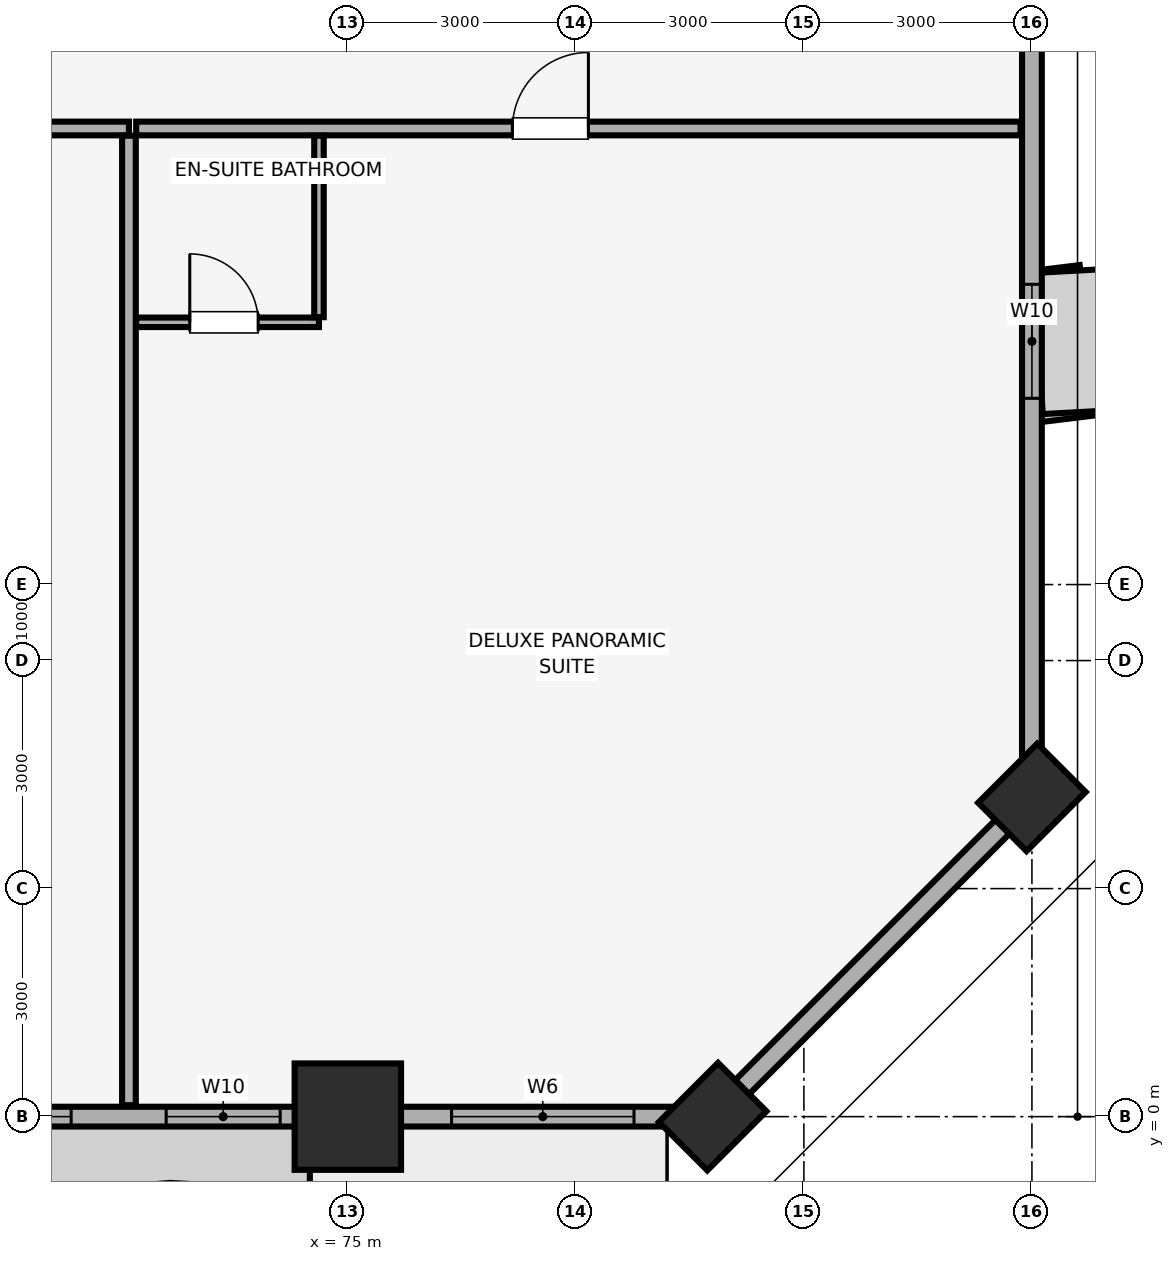
"""IFC4 building model, lengths in metres.
Left out: names, types, materials, properties, quantities, classifications, styles, units other than length and angle.
Written with IfcOpenShell. Run it as: python <this file> out.ifc"""

import sys

from ifc_helpers import new_model, si_unit, direction, frame, frame_2d, origin, origin_2d, place, context, subcontext, project, spatial, rectangle, extrude, element, fill, save


model = new_model("IFC4")
c1 = context("Model", 3, precision=1e-05, world=origin(), true_north=direction((0.0, 1.0)))
c2 = subcontext(c1, "Body", "Model", "MODEL_VIEW")
j1 = project(units=[si_unit("LENGTHUNIT", "METRE"), si_unit("PLANEANGLEUNIT", "RADIAN")], contexts=[c1])
p1 = place(None, origin())
s1 = spatial("IfcSite", under=j1, at=p1, CompositionType="ELEMENT")
p2 = place(p1, origin())
s2 = spatial("IfcBuilding", under=s1, at=p2, CompositionType="ELEMENT")
p3 = place(p2, frame((0.0, 0.0, 68.9)))
s3 = spatial("IfcBuildingStorey", under=s2, at=p3, CompositionType="ELEMENT", Elevation=68.9)
p4 = place(p3, frame((75.0, 0.0, 0.0), z_axis=(0.0, 0.0, 1.0), x_axis=(1.0, 0.0, 0.0)))
e1 = element("IfcColumn", 1, at=p4, inside=s3, PredefinedType="COLUMN", context=c2, shape_type="SweptSolid", body=[
    extrude(rectangle(XDim=1.4, YDim=1.4, at=origin_2d()), origin(), (0.0, 0.0, 1.0), 3.51),
])
for number, where, z_axis, x_axis in (
    (2, (79.8, 0.0, 0.0), (0.0, 0.0, 1.0), (0.707, 0.707, 0.0)),
    (3, (84.0, 4.2, 0.0), (0.0, 0.0, 1.0), (0.707, 0.707, 0.0)),
):
    element("IfcColumn", number, at=place(p3, frame(where, z_axis=z_axis, x_axis=x_axis)), inside=s3, PredefinedType="PILASTER", context=c2, shape_type="SweptSolid", body=[
        extrude(rectangle(XDim=1.1, YDim=0.9, at=origin_2d()), origin(), (0.0, 0.0, 1.0), 3.51),
    ])
p5 = place(p3, frame((4.2, 0.0, 0.0), z_axis=(0.0, 0.0, 1.0), x_axis=(1.0, 0.0, 0.0)))
e4 = element("IfcWall", 4, at=p5, inside=s3, PredefinedType="SOLIDWALL", context=c2, shape_type="SweptSolid", body=[
    extrude(rectangle(XDim=75.6, YDim=0.26, at=frame_2d((37.8, 0.0))), origin(), (0.0, 0.0, 1.0), 2.56),
])
p6 = place(p5, frame((13.517, 0.0, 0.0)))
e5 = element("IfcOpeningElement", 5, at=p6, cuts=e4, PredefinedType="OPENING", context=c2, shape_type="SweptSolid", body=[
    extrude(rectangle(XDim=1.1, YDim=2.15, at=frame_2d((0.55, 1.075))), frame((0.0, 0.14, 0.0), z_axis=(0.0, -1.0, 0.0), x_axis=(1.0, 0.0, 0.0)), (0.0, 0.0, 1.0), 0.28),
])
p7 = place(p5, frame((28.183, 0.0, 0.0)))
e6 = element("IfcOpeningElement", 6, at=p7, cuts=e4, PredefinedType="OPENING", context=c2, shape_type="SweptSolid", body=[
    extrude(rectangle(XDim=1.1, YDim=2.15, at=frame_2d((0.55, 1.075))), frame((0.0, 0.14, 0.0), z_axis=(0.0, -1.0, 0.0), x_axis=(1.0, 0.0, 0.0)), (0.0, 0.0, 1.0), 0.28),
])
p8 = place(p5, frame((58.094, 0.0, 0.0)))
e7 = element("IfcOpeningElement", 7, at=p8, cuts=e4, PredefinedType="OPENING", context=c2, shape_type="SweptSolid", body=[
    extrude(rectangle(XDim=1.1, YDim=2.15, at=frame_2d((0.55, 1.075))), frame((0.0, 0.14, 0.0), z_axis=(0.0, -1.0, 0.0), x_axis=(1.0, 0.0, 0.0)), (0.0, 0.0, 1.0), 0.28),
])
p9 = place(p5, frame((1.035, 0.0, 0.85)))
e8 = element("IfcOpeningElement", 8, at=p9, cuts=e4, PredefinedType="OPENING", context=c2, shape_type="SweptSolid", body=[
    extrude(rectangle(XDim=2.4, YDim=1.5, at=frame_2d((1.2, 0.75))), frame((0.0, 0.14, 0.0), z_axis=(0.0, -1.0, 0.0), x_axis=(1.0, 0.0, 0.0)), (0.0, 0.0, 1.0), 0.28),
])
p10 = place(p5, frame((5.74, 0.0, 0.85)))
e9 = element("IfcOpeningElement", 9, at=p10, cuts=e4, PredefinedType="OPENING", context=c2, shape_type="SweptSolid", body=[
    extrude(rectangle(XDim=1.5, YDim=1.4, at=frame_2d((0.75, 0.7))), frame((0.0, 0.14, 0.0), z_axis=(0.0, -1.0, 0.0), x_axis=(1.0, 0.0, 0.0)), (0.0, 0.0, 1.0), 0.28),
])
p11 = place(p5, frame((8.49, 0.0, 0.85)))
e10 = element("IfcOpeningElement", 10, at=p11, cuts=e4, PredefinedType="OPENING", context=c2, shape_type="SweptSolid", body=[
    extrude(rectangle(XDim=2.4, YDim=1.5, at=frame_2d((1.2, 0.75))), frame((0.0, 0.14, 0.0), z_axis=(0.0, -1.0, 0.0), x_axis=(1.0, 0.0, 0.0)), (0.0, 0.0, 1.0), 0.28),
])
p12 = place(p5, frame((15.855, 0.0, 0.85)))
e11 = element("IfcOpeningElement", 11, at=p12, cuts=e4, PredefinedType="OPENING", context=c2, shape_type="SweptSolid", body=[
    extrude(rectangle(XDim=2.4, YDim=1.5, at=frame_2d((1.2, 0.75))), frame((0.0, 0.14, 0.0), z_axis=(0.0, -1.0, 0.0), x_axis=(1.0, 0.0, 0.0)), (0.0, 0.0, 1.0), 0.28),
])
p13 = place(p5, frame((20.02, 0.0, 0.85)))
e12 = element("IfcOpeningElement", 12, at=p13, cuts=e4, PredefinedType="OPENING", context=c2, shape_type="SweptSolid", body=[
    extrude(rectangle(XDim=2.4, YDim=1.5, at=frame_2d((1.2, 0.75))), frame((0.0, 0.14, 0.0), z_axis=(0.0, -1.0, 0.0), x_axis=(1.0, 0.0, 0.0)), (0.0, 0.0, 1.0), 0.28),
])
p14 = place(p5, frame((23.67, 0.0, 0.85)))
e13 = element("IfcOpeningElement", 13, at=p14, cuts=e4, PredefinedType="OPENING", context=c2, shape_type="SweptSolid", body=[
    extrude(rectangle(XDim=1.5, YDim=1.4, at=frame_2d((0.75, 0.7))), frame((0.0, 0.14, 0.0), z_axis=(0.0, -1.0, 0.0), x_axis=(1.0, 0.0, 0.0)), (0.0, 0.0, 1.0), 0.28),
])
p15 = place(p5, frame((31.035, 0.0, 0.85)))
e14 = element("IfcOpeningElement", 14, at=p15, cuts=e4, PredefinedType="OPENING", context=c2, shape_type="SweptSolid", body=[
    extrude(rectangle(XDim=1.5, YDim=1.4, at=frame_2d((0.75, 0.7))), frame((0.0, 0.14, 0.0), z_axis=(0.0, -1.0, 0.0), x_axis=(1.0, 0.0, 0.0)), (0.0, 0.0, 1.0), 0.28),
])
p16 = place(p5, frame((34.75, 0.0, 0.85)))
e15 = element("IfcOpeningElement", 15, at=p16, cuts=e4, PredefinedType="OPENING", context=c2, shape_type="SweptSolid", body=[
    extrude(rectangle(XDim=2.4, YDim=1.5, at=frame_2d((1.2, 0.75))), frame((0.0, 0.14, 0.0), z_axis=(0.0, -1.0, 0.0), x_axis=(1.0, 0.0, 0.0)), (0.0, 0.0, 1.0), 0.28),
])
p17 = place(p5, frame((38.55, 0.0, 0.85)))
e16 = element("IfcOpeningElement", 16, at=p17, cuts=e4, PredefinedType="OPENING", context=c2, shape_type="SweptSolid", body=[
    extrude(rectangle(XDim=2.4, YDim=1.5, at=frame_2d((1.2, 0.75))), frame((0.0, 0.14, 0.0), z_axis=(0.0, -1.0, 0.0), x_axis=(1.0, 0.0, 0.0)), (0.0, 0.0, 1.0), 0.28),
])
p18 = place(p5, frame((43.165, 0.0, 0.85)))
e17 = element("IfcOpeningElement", 17, at=p18, cuts=e4, PredefinedType="OPENING", context=c2, shape_type="SweptSolid", body=[
    extrude(rectangle(XDim=1.5, YDim=1.4, at=frame_2d((0.75, 0.7))), frame((0.0, 0.14, 0.0), z_axis=(0.0, -1.0, 0.0), x_axis=(1.0, 0.0, 0.0)), (0.0, 0.0, 1.0), 0.28),
])
p19 = place(p5, frame((45.915, 0.0, 0.85)))
e18 = element("IfcOpeningElement", 18, at=p19, cuts=e4, PredefinedType="OPENING", context=c2, shape_type="SweptSolid", body=[
    extrude(rectangle(XDim=2.4, YDim=1.5, at=frame_2d((1.2, 0.75))), frame((0.0, 0.14, 0.0), z_axis=(0.0, -1.0, 0.0), x_axis=(1.0, 0.0, 0.0)), (0.0, 0.0, 1.0), 0.28),
])
p20 = place(p5, frame((50.081, 0.0, 0.85)))
e19 = element("IfcOpeningElement", 19, at=p20, cuts=e4, PredefinedType="OPENING", context=c2, shape_type="SweptSolid", body=[
    extrude(rectangle(XDim=2.4, YDim=1.5, at=frame_2d((1.2, 0.75))), frame((0.0, 0.14, 0.0), z_axis=(0.0, -1.0, 0.0), x_axis=(1.0, 0.0, 0.0)), (0.0, 0.0, 1.0), 0.28),
])
p21 = place(p5, frame((53.73, 0.0, 0.85)))
e20 = element("IfcOpeningElement", 20, at=p21, cuts=e4, PredefinedType="OPENING", context=c2, shape_type="SweptSolid", body=[
    extrude(rectangle(XDim=1.5, YDim=1.4, at=frame_2d((0.75, 0.7))), frame((0.0, 0.14, 0.0), z_axis=(0.0, -1.0, 0.0), x_axis=(1.0, 0.0, 0.0)), (0.0, 0.0, 1.0), 0.28),
])
p22 = place(p5, frame((61.095, 0.0, 0.85)))
e21 = element("IfcOpeningElement", 21, at=p22, cuts=e4, PredefinedType="OPENING", context=c2, shape_type="SweptSolid", body=[
    extrude(rectangle(XDim=1.5, YDim=1.4, at=frame_2d((0.75, 0.7))), frame((0.0, 0.14, 0.0), z_axis=(0.0, -1.0, 0.0), x_axis=(1.0, 0.0, 0.0)), (0.0, 0.0, 1.0), 0.28),
])
p23 = place(p5, frame((64.76, 0.0, 0.85)))
e22 = element("IfcOpeningElement", 22, at=p23, cuts=e4, PredefinedType="OPENING", context=c2, shape_type="SweptSolid", body=[
    extrude(rectangle(XDim=2.4, YDim=1.5, at=frame_2d((1.2, 0.75))), frame((0.0, 0.14, 0.0), z_axis=(0.0, -1.0, 0.0), x_axis=(1.0, 0.0, 0.0)), (0.0, 0.0, 1.0), 0.28),
])
p24 = place(p5, frame((68.41, 0.0, 0.85)))
e23 = element("IfcOpeningElement", 23, at=p24, cuts=e4, PredefinedType="OPENING", context=c2, shape_type="SweptSolid", body=[
    extrude(rectangle(XDim=1.5, YDim=1.4, at=frame_2d((0.75, 0.7))), frame((0.0, 0.14, 0.0), z_axis=(0.0, -1.0, 0.0), x_axis=(1.0, 0.0, 0.0)), (0.0, 0.0, 1.0), 0.28),
])
p25 = place(p5, frame((72.165, 0.0, 0.85)))
e24 = element("IfcOpeningElement", 24, at=p25, cuts=e4, PredefinedType="OPENING", context=c2, shape_type="SweptSolid", body=[
    extrude(rectangle(XDim=2.4, YDim=1.5, at=frame_2d((1.2, 0.75))), frame((0.0, 0.14, 0.0), z_axis=(0.0, -1.0, 0.0), x_axis=(1.0, 0.0, 0.0)), (0.0, 0.0, 1.0), 0.28),
])
p26 = place(p3, frame((79.8, 0.0, 0.0), z_axis=(0.0, 0.0, 1.0), x_axis=(0.707106781187, 0.707106781187, 0.0)))
e25 = element("IfcWall", 25, at=p26, inside=s3, PredefinedType="SOLIDWALL", context=c2, shape_type="SweptSolid", body=[
    extrude(rectangle(XDim=5.94, YDim=0.26, at=frame_2d((2.97, 0.0))), origin(), (0.0, 0.0, 1.0), 2.56),
])
p27 = place(p3, frame((84.0, 4.2, 0.0), z_axis=(0.0, 0.0, 1.0), x_axis=(0.0, 1.0, 0.0)))
e26 = element("IfcWall", 26, at=p27, inside=s3, PredefinedType="SOLIDWALL", context=c2, shape_type="SweptSolid", body=[
    extrude(rectangle(XDim=40.6, YDim=0.26, at=frame_2d((20.3, 0.0))), origin(), (0.0, 0.0, 1.0), 2.56),
])
p28 = place(p27, frame((5.25, 0.0, 0.85)))
e27 = element("IfcOpeningElement", 27, at=p28, cuts=e26, PredefinedType="OPENING", context=c2, shape_type="SweptSolid", body=[
    extrude(rectangle(XDim=1.5, YDim=1.4, at=frame_2d((0.75, 0.7))), frame((0.0, 0.14, 0.0), z_axis=(0.0, -1.0, 0.0), x_axis=(1.0, 0.0, 0.0)), (0.0, 0.0, 1.0), 0.28),
])
p29 = place(p27, frame((13.81, 0.0, 0.85)))
e28 = element("IfcOpeningElement", 28, at=p29, cuts=e26, PredefinedType="OPENING", context=c2, shape_type="SweptSolid", body=[
    extrude(rectangle(XDim=1.5, YDim=1.4, at=frame_2d((0.75, 0.7))), frame((0.0, 0.14, 0.0), z_axis=(0.0, -1.0, 0.0), x_axis=(1.0, 0.0, 0.0)), (0.0, 0.0, 1.0), 0.28),
])
p30 = place(p27, frame((20.61, 0.0, 0.85)))
e29 = element("IfcOpeningElement", 29, at=p30, cuts=e26, PredefinedType="OPENING", context=c2, shape_type="SweptSolid", body=[
    extrude(rectangle(XDim=1.5, YDim=1.4, at=frame_2d((0.75, 0.7))), frame((0.0, 0.14, 0.0), z_axis=(0.0, -1.0, 0.0), x_axis=(1.0, 0.0, 0.0)), (0.0, 0.0, 1.0), 0.28),
])
p31 = place(p27, frame((28.525, 0.0, 0.85)))
e30 = element("IfcOpeningElement", 30, at=p31, cuts=e26, PredefinedType="OPENING", context=c2, shape_type="SweptSolid", body=[
    extrude(rectangle(XDim=1.5, YDim=1.4, at=frame_2d((0.75, 0.7))), frame((0.0, 0.14, 0.0), z_axis=(0.0, -1.0, 0.0), x_axis=(1.0, 0.0, 0.0)), (0.0, 0.0, 1.0), 0.28),
])
p32 = place(p27, frame((37.365, 0.0, 0.85)))
e31 = element("IfcOpeningElement", 31, at=p32, cuts=e26, PredefinedType="OPENING", context=c2, shape_type="SweptSolid", body=[
    extrude(rectangle(XDim=1.5, YDim=1.4, at=frame_2d((0.75, 0.7))), frame((0.0, 0.14, 0.0), z_axis=(0.0, -1.0, 0.0), x_axis=(1.0, 0.0, 0.0)), (0.0, 0.0, 1.0), 0.28),
])
p33 = place(p3, frame((64.786, 13.0, 0.0), z_axis=(0.0, 0.0, 1.0), x_axis=(1.0, 0.0, 0.0)))
e32 = element("IfcWall", 32, at=p33, inside=s3, PredefinedType="PARTITIONING", context=c2, shape_type="SweptSolid", body=[
    extrude(rectangle(XDim=7.335, YDim=0.18, at=frame_2d((3.667, 0.0))), origin(), (0.0, 0.0, 1.0), 3.51),
])
p34 = place(p33, frame((5.064, 0.0, 0.0)))
e33 = element("IfcOpeningElement", 33, at=p34, cuts=e32, PredefinedType="OPENING", context=c2, shape_type="SweptSolid", body=[
    extrude(rectangle(XDim=1.0, YDim=2.15, at=frame_2d((0.5, 1.075))), frame((0.0, 0.1, 0.0), z_axis=(0.0, -1.0, 0.0), x_axis=(1.0, 0.0, 0.0)), (0.0, 0.0, 1.0), 0.2),
])
p35 = place(p3, frame((72.12, 0.15, 0.0), z_axis=(0.0, 0.0, 1.0), x_axis=(0.0, 1.0, 0.0)))
e34 = element("IfcWall", 34, at=p35, inside=s3, PredefinedType="PARTITIONING", context=c2, shape_type="SweptSolid", body=[
    extrude(rectangle(XDim=12.755, YDim=0.18, at=frame_2d((6.377, 0.0))), origin(), (0.0, 0.0, 1.0), 3.51),
])
p36 = place(p3, frame((72.215, 13.0, 0.0), z_axis=(0.0, 0.0, 1.0), x_axis=(1.0, 0.0, 0.0)))
e35 = element("IfcWall", 35, at=p36, inside=s3, PredefinedType="PARTITIONING", context=c2, shape_type="SweptSolid", body=[
    extrude(rectangle(XDim=11.635, YDim=0.18, at=frame_2d((5.817, 0.0))), origin(), (0.0, 0.0, 1.0), 3.51),
])
p37 = place(p36, frame((4.95, 0.0, 0.0)))
e36 = element("IfcOpeningElement", 36, at=p37, cuts=e35, PredefinedType="OPENING", context=c2, shape_type="SweptSolid", body=[
    extrude(rectangle(XDim=1.0, YDim=2.15, at=frame_2d((0.5, 1.075))), frame((0.0, 0.1, 0.0), z_axis=(0.0, -1.0, 0.0), x_axis=(1.0, 0.0, 0.0)), (0.0, 0.0, 1.0), 0.2),
])
p38 = place(p3, frame((72.215, 10.45, 0.0), z_axis=(0.0, 0.0, 1.0), x_axis=(1.0, 0.0, 0.0)))
e37 = element("IfcWall", 37, at=p38, inside=s3, PredefinedType="PARTITIONING", context=c2, shape_type="SweptSolid", body=[
    extrude(rectangle(XDim=2.405, YDim=0.125, at=frame_2d((1.203, 0.0))), origin(), (0.0, 0.0, 1.0), 3.51),
])
p39 = place(p38, frame((0.705, 0.0, 0.0)))
e38 = element("IfcOpeningElement", 38, at=p39, cuts=e37, PredefinedType="OPENING", context=c2, shape_type="SweptSolid", body=[
    extrude(rectangle(XDim=0.9, YDim=2.1, at=frame_2d((0.45, 1.05))), frame((0.0, 0.073, 0.0), z_axis=(0.0, -1.0, 0.0), x_axis=(1.0, 0.0, 0.0)), (0.0, 0.0, 1.0), 0.145),
])
p40 = place(p3, frame((74.62, 10.518, 0.0), z_axis=(0.0, 0.0, 1.0), x_axis=(0.0, 1.0, 0.0)))
e39 = element("IfcWall", 39, at=p40, inside=s3, PredefinedType="PARTITIONING", context=c2, shape_type="SweptSolid", body=[
    extrude(rectangle(XDim=2.387, YDim=0.125, at=frame_2d((1.194, 0.0))), origin(), (0.0, 0.0, 1.0), 3.51),
])
p41 = place(p23, origin())
e40 = element("IfcWindow", 40, at=p41, inside=s3, PartitioningType="SINGLE_PANEL", PredefinedType="WINDOW", context=c2, shape_type="SweptSolid", body=[
    extrude(rectangle(XDim=2.4, YDim=1.5, at=frame_2d((1.2, 0.75))), frame((0.0, 0.03, 0.0), z_axis=(0.0, -1.0, 0.0), x_axis=(1.0, 0.0, 0.0)), (0.0, 0.0, 1.0), 0.06),
])
fill(e22, e40)
p42 = place(p24, origin())
e41 = element("IfcWindow", 41, at=p42, inside=s3, PartitioningType="SINGLE_PANEL", PredefinedType="WINDOW", context=c2, shape_type="SweptSolid", body=[
    extrude(rectangle(XDim=1.5, YDim=1.4, at=frame_2d((0.75, 0.7))), frame((0.0, 0.03, 0.0), z_axis=(0.0, -1.0, 0.0), x_axis=(1.0, 0.0, 0.0)), (0.0, 0.0, 1.0), 0.06),
])
fill(e23, e41)
p43 = place(p25, origin())
e42 = element("IfcWindow", 42, at=p43, inside=s3, PartitioningType="SINGLE_PANEL", PredefinedType="WINDOW", context=c2, shape_type="SweptSolid", body=[
    extrude(rectangle(XDim=2.4, YDim=1.5, at=frame_2d((1.2, 0.75))), frame((0.0, 0.03, 0.0), z_axis=(0.0, -1.0, 0.0), x_axis=(1.0, 0.0, 0.0)), (0.0, 0.0, 1.0), 0.06),
])
fill(e24, e42)
p44 = place(p28, origin())
e43 = element("IfcWindow", 43, at=p44, inside=s3, PartitioningType="SINGLE_PANEL", PredefinedType="WINDOW", context=c2, shape_type="SweptSolid", body=[
    extrude(rectangle(XDim=1.5, YDim=1.4, at=frame_2d((0.75, 0.7))), frame((0.0, 0.03, 0.0), z_axis=(0.0, -1.0, 0.0), x_axis=(1.0, 0.0, 0.0)), (0.0, 0.0, 1.0), 0.06),
])
fill(e27, e43)
p45 = place(p37, origin())
e44 = element("IfcDoor", 44, at=p45, inside=s3, OperationType="SINGLE_SWING_RIGHT", PredefinedType="DOOR", context=c2, shape_type="SweptSolid", body=[
    extrude(rectangle(XDim=1.0, YDim=2.15, at=frame_2d((0.5, 1.075))), frame((0.0, 0.025, 0.0), z_axis=(0.0, -1.0, 0.0), x_axis=(1.0, 0.0, 0.0)), (0.0, 0.0, 1.0), 0.05),
])
fill(e36, e44)
p46 = place(p39, origin())
e45 = element("IfcDoor", 45, at=p46, inside=s3, OperationType="SINGLE_SWING_LEFT", PredefinedType="DOOR", context=c2, shape_type="SweptSolid", body=[
    extrude(rectangle(XDim=0.9, YDim=2.1, at=frame_2d((0.45, 1.05))), frame((0.0, 0.025, 0.0), z_axis=(0.0, -1.0, 0.0), x_axis=(1.0, 0.0, 0.0)), (0.0, 0.0, 1.0), 0.05),
])
fill(e38, e45)
save(model, sys.argv[1])
